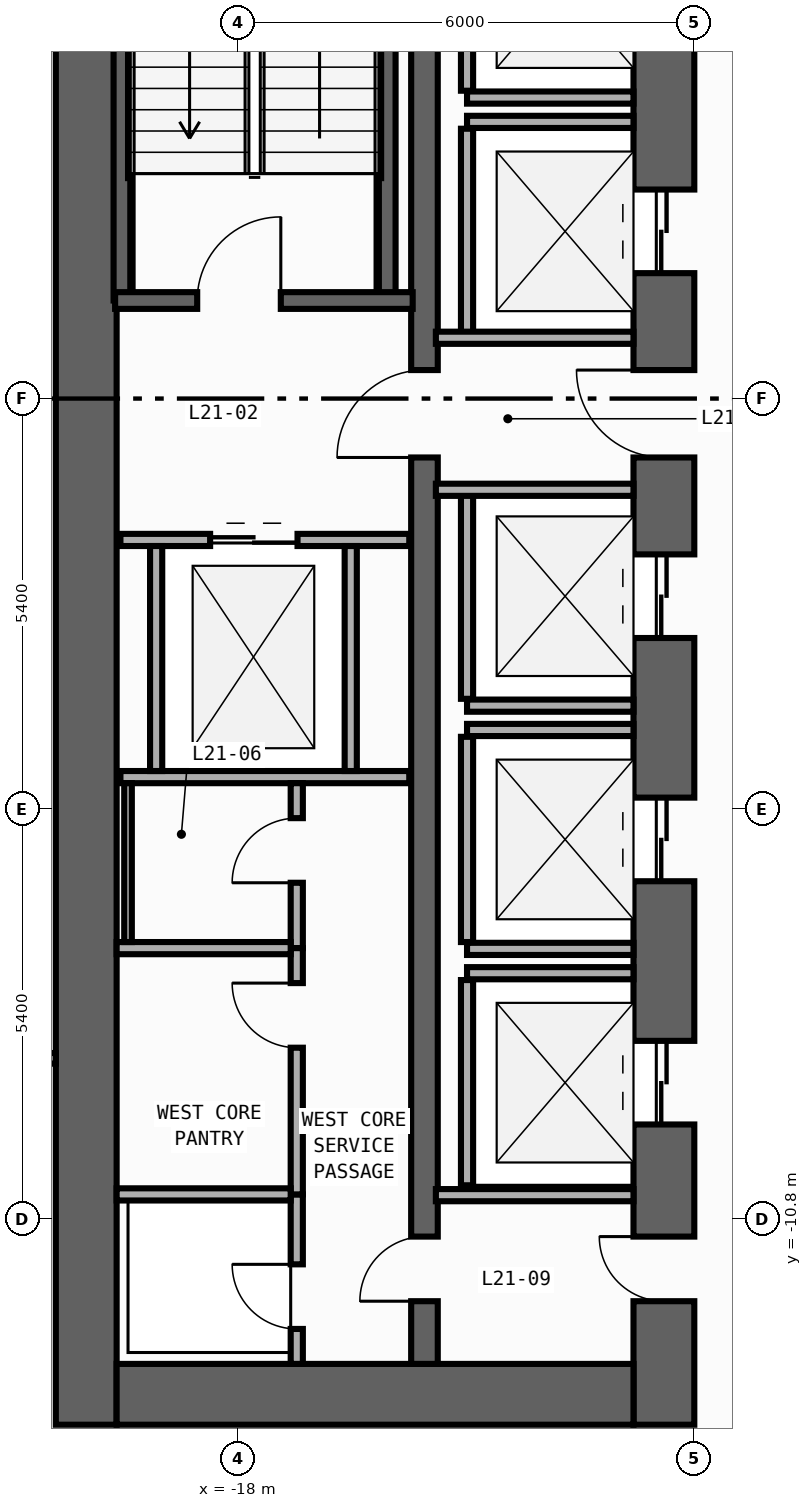
"""IFC4 building model, lengths in metres.
Left out: names, types, materials, properties, quantities, classifications, styles, units other than length and angle.
Written with IfcOpenShell. Run it as: python <this file> out.ifc"""

import sys

from ifc_helpers import new_model, si_unit, direction, frame, frame_2d, origin, place, context, subcontext, project, spatial, rectangle, extrude, element, fill, save


model = new_model("IFC4")
c1 = context("Model", 3, precision=1e-05, world=origin(), true_north=direction((0.0, 1.0)))
c2 = subcontext(c1, "Body", "Model", "MODEL_VIEW")
j1 = project(units=[si_unit("LENGTHUNIT", "METRE"), si_unit("PLANEANGLEUNIT", "RADIAN")], contexts=[c1])
p1 = place(None, origin())
s1 = spatial("IfcSite", under=j1, at=p1, CompositionType="ELEMENT")
p2 = place(p1, origin())
s2 = spatial("IfcBuilding", under=s1, at=p2, CompositionType="ELEMENT")
p3 = place(p2, frame((0.0, 0.0, 93.2)))
s3 = spatial("IfcBuildingStorey", under=s2, at=p3, CompositionType="ELEMENT", Elevation=93.2)
p4 = place(p3, frame((-20.0, -13.5, 0.0), z_axis=(0.0, 0.0, 1.0), x_axis=(0.0, 1.0, 0.0)))
e1 = element("IfcWall", 1, at=p4, inside=s3, PredefinedType="SHEAR", context=c2, shape_type="SweptSolid", body=[
    extrude(rectangle(XDim=27.0, YDim=0.8, at=frame_2d((13.5, 0.0))), origin(), (0.0, 0.0, 1.0), 3.94),
])
p5 = place(p3, frame((-12.4, -13.5, 0.0), z_axis=(0.0, 0.0, 1.0), x_axis=(0.0, 1.0, 0.0)))
e2 = element("IfcWall", 2, at=p5, inside=s3, PredefinedType="SHEAR", context=c2, shape_type="SweptSolid", body=[
    extrude(rectangle(XDim=27.0, YDim=0.8, at=frame_2d((13.5, 0.0))), origin(), (0.0, 0.0, 1.0), 3.94),
])
p6 = place(p5, frame((21.55, 0.0, 0.0)))
e3 = element("IfcOpeningElement", 3, at=p6, cuts=e2, PredefinedType="OPENING", context=c2, shape_type="SweptSolid", body=[
    extrude(rectangle(XDim=1.1, YDim=2.2, at=frame_2d((0.55, 1.1))), frame((0.0, 0.41, 0.0), z_axis=(0.0, -1.0, 0.0), x_axis=(1.0, 0.0, 0.0)), (0.0, 0.0, 1.0), 0.82),
])
p7 = place(p5, frame((18.35, 0.0, 0.0)))
e4 = element("IfcOpeningElement", 4, at=p7, cuts=e2, PredefinedType="OPENING", context=c2, shape_type="SweptSolid", body=[
    extrude(rectangle(XDim=1.1, YDim=2.2, at=frame_2d((0.55, 1.1))), frame((0.0, 0.41, 0.0), z_axis=(0.0, -1.0, 0.0), x_axis=(1.0, 0.0, 0.0)), (0.0, 0.0, 1.0), 0.82),
])
p8 = place(p5, frame((15.15, 0.0, 0.0)))
e5 = element("IfcOpeningElement", 5, at=p8, cuts=e2, PredefinedType="OPENING", context=c2, shape_type="SweptSolid", body=[
    extrude(rectangle(XDim=1.1, YDim=2.2, at=frame_2d((0.55, 1.1))), frame((0.0, 0.41, 0.0), z_axis=(0.0, -1.0, 0.0), x_axis=(1.0, 0.0, 0.0)), (0.0, 0.0, 1.0), 0.82),
])
p9 = place(p5, frame((10.35, 0.0, 0.0)))
e6 = element("IfcOpeningElement", 6, at=p9, cuts=e2, PredefinedType="OPENING", context=c2, shape_type="SweptSolid", body=[
    extrude(rectangle(XDim=1.1, YDim=2.2, at=frame_2d((0.55, 1.1))), frame((0.0, 0.41, 0.0), z_axis=(0.0, -1.0, 0.0), x_axis=(1.0, 0.0, 0.0)), (0.0, 0.0, 1.0), 0.82),
])
p10 = place(p5, frame((7.15, 0.0, 0.0)))
e7 = element("IfcOpeningElement", 7, at=p10, cuts=e2, PredefinedType="OPENING", context=c2, shape_type="SweptSolid", body=[
    extrude(rectangle(XDim=1.1, YDim=2.2, at=frame_2d((0.55, 1.1))), frame((0.0, 0.41, 0.0), z_axis=(0.0, -1.0, 0.0), x_axis=(1.0, 0.0, 0.0)), (0.0, 0.0, 1.0), 0.82),
])
p11 = place(p5, frame((3.95, 0.0, 0.0)))
e8 = element("IfcOpeningElement", 8, at=p11, cuts=e2, PredefinedType="OPENING", context=c2, shape_type="SweptSolid", body=[
    extrude(rectangle(XDim=1.1, YDim=2.2, at=frame_2d((0.55, 1.1))), frame((0.0, 0.41, 0.0), z_axis=(0.0, -1.0, 0.0), x_axis=(1.0, 0.0, 0.0)), (0.0, 0.0, 1.0), 0.82),
])
p12 = place(p5, frame((12.725, 0.0, 0.0)))
e9 = element("IfcOpeningElement", 9, at=p12, cuts=e2, PredefinedType="OPENING", context=c2, shape_type="SweptSolid", body=[
    extrude(rectangle(XDim=1.15, YDim=2.2, at=frame_2d((0.575, 1.1))), frame((0.0, 0.41, 0.0), z_axis=(0.0, -1.0, 0.0), x_axis=(1.0, 0.0, 0.0)), (0.0, 0.0, 1.0), 0.82),
])
p13 = place(p5, frame((1.625, 0.0, 0.0)))
e10 = element("IfcOpeningElement", 10, at=p13, cuts=e2, PredefinedType="OPENING", context=c2, shape_type="SweptSolid", body=[
    extrude(rectangle(XDim=0.85, YDim=2.1, at=frame_2d((0.425, 1.05))), frame((0.0, 0.41, 0.0), z_axis=(0.0, -1.0, 0.0), x_axis=(1.0, 0.0, 0.0)), (0.0, 0.0, 1.0), 0.82),
])
p14 = place(p3, frame((-19.6, -13.1, 0.0), z_axis=(0.0, 0.0, 1.0), x_axis=(1.0, 0.0, 0.0)))
e11 = element("IfcWall", 11, at=p14, inside=s3, PredefinedType="SHEAR", context=c2, shape_type="SweptSolid", body=[
    extrude(rectangle(XDim=6.8, YDim=0.8, at=frame_2d((3.4, 0.0))), origin(), (0.0, 0.0, 1.0), 3.94),
])
p15 = place(p3, frame((-15.55, -12.7, 0.0), z_axis=(0.0, 0.0, 1.0), x_axis=(0.0, 1.0, 0.0)))
e12 = element("IfcWall", 12, at=p15, inside=s3, PredefinedType="SHEAR", context=c2, shape_type="SweptSolid", body=[
    extrude(rectangle(XDim=25.4, YDim=0.35, at=frame_2d((12.7, 0.0))), origin(), (0.0, 0.0, 1.0), 3.94),
])
p16 = place(p15, frame((11.925, 0.0, 0.0)))
e13 = element("IfcOpeningElement", 13, at=p16, cuts=e12, PredefinedType="OPENING", context=c2, shape_type="SweptSolid", body=[
    extrude(rectangle(XDim=1.15, YDim=2.2, at=frame_2d((0.575, 1.1))), frame((0.0, 0.185, 0.0), z_axis=(0.0, -1.0, 0.0), x_axis=(1.0, 0.0, 0.0)), (0.0, 0.0, 1.0), 0.37),
])
p17 = place(p15, frame((0.825, 0.0, 0.0)))
e14 = element("IfcOpeningElement", 14, at=p17, cuts=e12, PredefinedType="OPENING", context=c2, shape_type="SweptSolid", body=[
    extrude(rectangle(XDim=0.85, YDim=2.1, at=frame_2d((0.425, 1.05))), frame((0.0, 0.185, 0.0), z_axis=(0.0, -1.0, 0.0), x_axis=(1.0, 0.0, 0.0)), (0.0, 0.0, 1.0), 0.37),
])
for number, where, z_axis, x_axis in (
    (15, (-16.04, 1.29, 0.0), (0.0, 0.0, 1.0), (0.0, 1.0, 0.0)),
    (16, (-19.53, 1.29, 0.0), (0.0, 0.0, 1.0), (0.0, 1.0, 0.0)),
):
    element("IfcWall", number, at=place(p3, frame(where, z_axis=z_axis, x_axis=x_axis)), inside=s3, PredefinedType="SHEAR", context=c2, shape_type="SweptSolid", body=[
        extrude(rectangle(XDim=11.3, YDim=0.22, at=frame_2d((5.65, 0.0))), origin(), (0.0, 0.0, 1.0), 3.94),
    ])
p18 = place(p3, frame((-19.62, 1.29, 0.0), z_axis=(0.0, 0.0, 1.0), x_axis=(1.0, 0.0, 0.0)))
e17 = element("IfcWall", 17, at=p18, inside=s3, PredefinedType="SHEAR", context=c2, shape_type="SweptSolid", body=[
    extrude(rectangle(XDim=3.915, YDim=0.22, at=frame_2d((1.958, 0.0))), origin(), (0.0, 0.0, 1.0), 3.94),
])
p19 = place(p18, frame((1.08, 0.0, 0.0)))
e18 = element("IfcOpeningElement", 18, at=p19, cuts=e17, PredefinedType="OPENING", context=c2, shape_type="SweptSolid", body=[
    extrude(rectangle(XDim=1.1, YDim=2.2, at=frame_2d((0.55, 1.1))), frame((0.0, 0.12, 0.0), z_axis=(0.0, -1.0, 0.0), x_axis=(1.0, 0.0, 0.0)), (0.0, 0.0, 1.0), 0.24),
])
p20 = place(p3, frame((-14.99, 3.96, 0.0), z_axis=(0.0, 0.0, 1.0), x_axis=(1.0, 0.0, 0.0)))
e19 = element("IfcWall", 19, at=p20, inside=s3, PredefinedType="STANDARD", context=c2, shape_type="SweptSolid", body=[
    extrude(rectangle(XDim=2.19, YDim=0.16, at=frame_2d((1.095, 0.0))), origin(), (0.0, 0.0, 1.0), 3.94),
])
p21 = place(p3, frame((-14.99, 4.05, 0.0), z_axis=(0.0, 0.0, 1.0), x_axis=(0.0, 1.0, 0.0)))
e20 = element("IfcWall", 20, at=p21, inside=s3, PredefinedType="STANDARD", context=c2, shape_type="SweptSolid", body=[
    extrude(rectangle(XDim=2.7, YDim=0.16, at=frame_2d((1.35, 0.0))), origin(), (0.0, 0.0, 1.0), 3.94),
])
p22 = place(p3, frame((-14.99, 3.64, 0.0), z_axis=(0.0, 0.0, 1.0), x_axis=(1.0, 0.0, 0.0)))
e21 = element("IfcWall", 21, at=p22, inside=s3, PredefinedType="STANDARD", context=c2, shape_type="SweptSolid", body=[
    extrude(rectangle(XDim=2.19, YDim=0.16, at=frame_2d((1.095, 0.0))), origin(), (0.0, 0.0, 1.0), 3.94),
])
p23 = place(p3, frame((-14.99, 0.85, 0.0), z_axis=(0.0, 0.0, 1.0), x_axis=(0.0, 1.0, 0.0)))
e22 = element("IfcWall", 22, at=p23, inside=s3, PredefinedType="STANDARD", context=c2, shape_type="SweptSolid", body=[
    extrude(rectangle(XDim=2.7, YDim=0.16, at=frame_2d((1.35, 0.0))), origin(), (0.0, 0.0, 1.0), 3.94),
])
p24 = place(p3, frame((-14.99, -4.04, 0.0), z_axis=(0.0, 0.0, 1.0), x_axis=(1.0, 0.0, 0.0)))
e23 = element("IfcWall", 23, at=p24, inside=s3, PredefinedType="STANDARD", context=c2, shape_type="SweptSolid", body=[
    extrude(rectangle(XDim=2.19, YDim=0.16, at=frame_2d((1.095, 0.0))), origin(), (0.0, 0.0, 1.0), 3.94),
])
p25 = place(p3, frame((-14.99, -3.95, 0.0), z_axis=(0.0, 0.0, 1.0), x_axis=(0.0, 1.0, 0.0)))
e24 = element("IfcWall", 24, at=p25, inside=s3, PredefinedType="STANDARD", context=c2, shape_type="SweptSolid", body=[
    extrude(rectangle(XDim=2.7, YDim=0.16, at=frame_2d((1.35, 0.0))), origin(), (0.0, 0.0, 1.0), 3.94),
])
for number, where, z_axis, x_axis in (
    (25, (-14.99, -7.24, 0.0), (0.0, 0.0, 1.0), (1.0, 0.0, 0.0)),
    (26, (-14.99, -4.36, 0.0), (0.0, 0.0, 1.0), (1.0, 0.0, 0.0)),
):
    element("IfcWall", number, at=place(p3, frame(where, z_axis=z_axis, x_axis=x_axis)), inside=s3, PredefinedType="STANDARD", context=c2, shape_type="SweptSolid", body=[
        extrude(rectangle(XDim=2.19, YDim=0.16, at=frame_2d((1.095, 0.0))), origin(), (0.0, 0.0, 1.0), 3.94),
    ])
p26 = place(p3, frame((-14.99, -7.15, 0.0), z_axis=(0.0, 0.0, 1.0), x_axis=(0.0, 1.0, 0.0)))
e27 = element("IfcWall", 27, at=p26, inside=s3, PredefinedType="STANDARD", context=c2, shape_type="SweptSolid", body=[
    extrude(rectangle(XDim=2.7, YDim=0.16, at=frame_2d((1.35, 0.0))), origin(), (0.0, 0.0, 1.0), 3.94),
])
p27 = place(p3, frame((-14.99, -7.56, 0.0), z_axis=(0.0, 0.0, 1.0), x_axis=(1.0, 0.0, 0.0)))
e28 = element("IfcWall", 28, at=p27, inside=s3, PredefinedType="STANDARD", context=c2, shape_type="SweptSolid", body=[
    extrude(rectangle(XDim=2.19, YDim=0.16, at=frame_2d((1.095, 0.0))), origin(), (0.0, 0.0, 1.0), 3.94),
])
p28 = place(p3, frame((-14.99, -10.35, 0.0), z_axis=(0.0, 0.0, 1.0), x_axis=(0.0, 1.0, 0.0)))
e29 = element("IfcWall", 29, at=p28, inside=s3, PredefinedType="STANDARD", context=c2, shape_type="SweptSolid", body=[
    extrude(rectangle(XDim=2.7, YDim=0.16, at=frame_2d((1.35, 0.0))), origin(), (0.0, 0.0, 1.0), 3.94),
])
p29 = place(p3, frame((-19.55, -1.86, 0.0), z_axis=(0.0, 0.0, 1.0), x_axis=(1.0, 0.0, 0.0)))
e30 = element("IfcWall", 30, at=p29, inside=s3, PredefinedType="STANDARD", context=c2, shape_type="SweptSolid", body=[
    extrude(rectangle(XDim=3.8, YDim=0.16, at=frame_2d((1.9, 0.0))), origin(), (0.0, 0.0, 1.0), 3.94),
])
p30 = place(p29, frame((1.18, 0.0, 0.0)))
e31 = element("IfcOpeningElement", 31, at=p30, cuts=e30, PredefinedType="OPENING", context=c2, shape_type="SweptSolid", body=[
    extrude(rectangle(XDim=1.15, YDim=2.2, at=frame_2d((0.575, 1.1))), frame((0.0, 0.09, 0.0), z_axis=(0.0, -1.0, 0.0), x_axis=(1.0, 0.0, 0.0)), (0.0, 0.0, 1.0), 0.18),
])
p31 = place(p3, frame((-19.55, -4.98, 0.0), z_axis=(0.0, 0.0, 1.0), x_axis=(1.0, 0.0, 0.0)))
e32 = element("IfcWall", 32, at=p31, inside=s3, PredefinedType="STANDARD", context=c2, shape_type="SweptSolid", body=[
    extrude(rectangle(XDim=3.8, YDim=0.16, at=frame_2d((1.9, 0.0))), origin(), (0.0, 0.0, 1.0), 3.94),
])
for number, where, z_axis, x_axis in (
    (33, (-19.08, -4.9, 0.0), (0.0, 0.0, 1.0), (0.0, 1.0, 0.0)),
    (34, (-16.52, -4.9, 0.0), (0.0, 0.0, 1.0), (0.0, 1.0, 0.0)),
):
    element("IfcWall", number, at=place(p3, frame(where, z_axis=z_axis, x_axis=x_axis)), inside=s3, PredefinedType="STANDARD", context=c2, shape_type="SweptSolid", body=[
        extrude(rectangle(XDim=2.96, YDim=0.16, at=frame_2d((1.48, 0.0))), origin(), (0.0, 0.0, 1.0), 3.94),
    ])
for number, where, z_axis, x_axis in (
    (35, (-15.4, 0.8, 0.0), (0.0, 0.0, 1.0), (1.0, 0.0, 0.0)),
    (36, (-15.4, -1.2, 0.0), (0.0, 0.0, 1.0), (1.0, 0.0, 0.0)),
    (37, (-15.4, -10.48, 0.0), (0.0, 0.0, 1.0), (1.0, 0.0, 0.0)),
):
    element("IfcWall", number, at=place(p3, frame(where, z_axis=z_axis, x_axis=x_axis)), inside=s3, PredefinedType="STANDARD", context=c2, shape_type="SweptSolid", body=[
        extrude(rectangle(XDim=2.6, YDim=0.16, at=frame_2d((1.3, 0.0))), origin(), (0.0, 0.0, 1.0), 3.94),
    ])
p32 = place(p3, frame((-17.23, -12.7, 0.0), z_axis=(0.0, 0.0, 1.0), x_axis=(0.0, 1.0, 0.0)))
e38 = element("IfcWall", 38, at=p32, inside=s3, PredefinedType="PARTITIONING", context=c2, shape_type="SweptSolid", body=[
    extrude(rectangle(XDim=2.23, YDim=0.16, at=frame_2d((1.115, 0.0))), origin(), (0.0, 0.0, 1.0), 3.94),
])
p33 = place(p32, frame((0.46, 0.0, 0.0)))
e39 = element("IfcOpeningElement", 39, at=p33, cuts=e38, PredefinedType="OPENING", context=c2, shape_type="SweptSolid", body=[
    extrude(rectangle(XDim=0.85, YDim=2.1, at=frame_2d((0.425, 1.05))), frame((0.0, 0.09, 0.0), z_axis=(0.0, -1.0, 0.0), x_axis=(1.0, 0.0, 0.0)), (0.0, 0.0, 1.0), 0.18),
])
p34 = place(p3, frame((-17.23, -7.23, 0.0), z_axis=(0.0, 0.0, 1.0), x_axis=(0.0, 1.0, 0.0)))
e40 = element("IfcWall", 40, at=p34, inside=s3, PredefinedType="PARTITIONING", context=c2, shape_type="SweptSolid", body=[
    extrude(rectangle(XDim=2.17, YDim=0.16, at=frame_2d((1.085, 0.0))), origin(), (0.0, 0.0, 1.0), 3.94),
])
p35 = place(p34, frame((0.86, 0.0, 0.0)))
e41 = element("IfcOpeningElement", 41, at=p35, cuts=e40, PredefinedType="OPENING", context=c2, shape_type="SweptSolid", body=[
    extrude(rectangle(XDim=0.85, YDim=2.1, at=frame_2d((0.425, 1.05))), frame((0.0, 0.09, 0.0), z_axis=(0.0, -1.0, 0.0), x_axis=(1.0, 0.0, 0.0)), (0.0, 0.0, 1.0), 0.18),
])
p36 = place(p3, frame((-17.23, -10.47, 0.0), z_axis=(0.0, 0.0, 1.0), x_axis=(0.0, 1.0, 0.0)))
e42 = element("IfcWall", 42, at=p36, inside=s3, PredefinedType="PARTITIONING", context=c2, shape_type="SweptSolid", body=[
    extrude(rectangle(XDim=3.24, YDim=0.16, at=frame_2d((1.62, 0.0))), origin(), (0.0, 0.0, 1.0), 3.94),
])
p37 = place(p36, frame((1.93, 0.0, 0.0)))
e43 = element("IfcOpeningElement", 43, at=p37, cuts=e42, PredefinedType="OPENING", context=c2, shape_type="SweptSolid", body=[
    extrude(rectangle(XDim=0.85, YDim=2.1, at=frame_2d((0.425, 1.05))), frame((0.0, 0.09, 0.0), z_axis=(0.0, -1.0, 0.0), x_axis=(1.0, 0.0, 0.0)), (0.0, 0.0, 1.0), 0.18),
])
for number, where, z_axis, x_axis in (
    (44, (-19.6, -10.47, 0.0), (0.0, 0.0, 1.0), (1.0, 0.0, 0.0)),
    (45, (-19.6, -7.23, 0.0), (0.0, 0.0, 1.0), (1.0, 0.0, 0.0)),
):
    element("IfcWall", number, at=place(p3, frame(where, z_axis=z_axis, x_axis=x_axis)), inside=s3, PredefinedType="PARTITIONING", context=c2, shape_type="SweptSolid", body=[
        extrude(rectangle(XDim=2.29, YDim=0.16, at=frame_2d((1.145, 0.0))), origin(), (0.0, 0.0, 1.0), 3.94),
    ])
p38 = place(p3, frame((-23.455, -8.68, 0.0), z_axis=(0.0, 0.0, 1.0), x_axis=(1.0, 0.0, 0.0)))
e46 = element("IfcWall", 46, at=p38, inside=s3, PredefinedType="PARTITIONING", context=c2, shape_type="SweptSolid", body=[
    extrude(rectangle(XDim=3.055, YDim=0.14, at=frame_2d((1.528, 0.0))), origin(), (0.0, 0.0, 1.0), 3.94),
])
p39 = place(p38, frame((1.745, 0.0, 0.0)))
e47 = element("IfcOpeningElement", 47, at=p39, cuts=e46, PredefinedType="OPENING", context=c2, shape_type="SweptSolid", body=[
    extrude(rectangle(XDim=0.85, YDim=2.1, at=frame_2d((0.425, 1.05))), frame((0.0, 0.08, 0.0), z_axis=(0.0, -1.0, 0.0), x_axis=(1.0, 0.0, 0.0)), (0.0, 0.0, 1.0), 0.16),
])
p40 = place(p3, frame((-19.45, -7.15, 0.0), z_axis=(0.0, 0.0, 1.0), x_axis=(0.0, 1.0, 0.0)))
e48 = element("IfcWall", 48, at=p40, inside=s3, PredefinedType="PARTITIONING", context=c2, shape_type="SweptSolid", body=[
    extrude(rectangle(XDim=2.09, YDim=0.1, at=frame_2d((1.045, 0.0))), origin(), (0.0, 0.0, 1.0), 3.94),
])
p41 = place(p19, origin())
e49 = element("IfcDoor", 49, at=p41, inside=s3, OperationType="SINGLE_SWING_RIGHT", PredefinedType="DOOR", context=c2, shape_type="SweptSolid", body=[
    extrude(rectangle(XDim=1.1, YDim=2.2, at=frame_2d((0.55, 1.1))), frame((0.0, 0.025, 0.0), z_axis=(0.0, -1.0, 0.0), x_axis=(1.0, 0.0, 0.0)), (0.0, 0.0, 1.0), 0.05),
])
fill(e18, e49)
p42 = place(p8, origin())
e50 = element("IfcDoor", 50, at=p42, inside=s3, OperationType="DOUBLE_DOOR_SLIDING", PredefinedType="DOOR", context=c2, shape_type="SweptSolid", body=[
    extrude(rectangle(XDim=1.1, YDim=2.2, at=frame_2d((0.55, 1.1))), frame((0.0, 0.025, 0.0), z_axis=(0.0, -1.0, 0.0), x_axis=(1.0, 0.0, 0.0)), (0.0, 0.0, 1.0), 0.05),
])
fill(e5, e50)
p43 = place(p9, origin())
e51 = element("IfcDoor", 51, at=p43, inside=s3, OperationType="DOUBLE_DOOR_SLIDING", PredefinedType="DOOR", context=c2, shape_type="SweptSolid", body=[
    extrude(rectangle(XDim=1.1, YDim=2.2, at=frame_2d((0.55, 1.1))), frame((0.0, 0.025, 0.0), z_axis=(0.0, -1.0, 0.0), x_axis=(1.0, 0.0, 0.0)), (0.0, 0.0, 1.0), 0.05),
])
fill(e6, e51)
p44 = place(p10, origin())
e52 = element("IfcDoor", 52, at=p44, inside=s3, OperationType="DOUBLE_DOOR_SLIDING", PredefinedType="DOOR", context=c2, shape_type="SweptSolid", body=[
    extrude(rectangle(XDim=1.1, YDim=2.2, at=frame_2d((0.55, 1.1))), frame((0.0, 0.025, 0.0), z_axis=(0.0, -1.0, 0.0), x_axis=(1.0, 0.0, 0.0)), (0.0, 0.0, 1.0), 0.05),
])
fill(e7, e52)
p45 = place(p11, origin())
e53 = element("IfcDoor", 53, at=p45, inside=s3, OperationType="DOUBLE_DOOR_SLIDING", PredefinedType="DOOR", context=c2, shape_type="SweptSolid", body=[
    extrude(rectangle(XDim=1.1, YDim=2.2, at=frame_2d((0.55, 1.1))), frame((0.0, 0.025, 0.0), z_axis=(0.0, -1.0, 0.0), x_axis=(1.0, 0.0, 0.0)), (0.0, 0.0, 1.0), 0.05),
])
fill(e8, e53)
p46 = place(p12, origin())
e54 = element("IfcDoor", 54, at=p46, inside=s3, OperationType="SINGLE_SWING_RIGHT", PredefinedType="DOOR", context=c2, shape_type="SweptSolid", body=[
    extrude(rectangle(XDim=1.15, YDim=2.2, at=frame_2d((0.575, 1.1))), frame((0.0, 0.025, 0.0), z_axis=(0.0, -1.0, 0.0), x_axis=(1.0, 0.0, 0.0)), (0.0, 0.0, 1.0), 0.05),
])
fill(e9, e54)
p47 = place(p16, origin())
e55 = element("IfcDoor", 55, at=p47, inside=s3, OperationType="SINGLE_SWING_LEFT", PredefinedType="DOOR", context=c2, shape_type="SweptSolid", body=[
    extrude(rectangle(XDim=1.15, YDim=2.2, at=frame_2d((0.575, 1.1))), frame((0.0, 0.025, 0.0), z_axis=(0.0, -1.0, 0.0), x_axis=(1.0, 0.0, 0.0)), (0.0, 0.0, 1.0), 0.05),
])
fill(e13, e55)
p48 = place(p13, origin())
e56 = element("IfcDoor", 56, at=p48, inside=s3, OperationType="SINGLE_SWING_RIGHT", PredefinedType="DOOR", context=c2, shape_type="SweptSolid", body=[
    extrude(rectangle(XDim=0.85, YDim=2.1, at=frame_2d((0.425, 1.05))), frame((0.0, 0.025, 0.0), z_axis=(0.0, -1.0, 0.0), x_axis=(1.0, 0.0, 0.0)), (0.0, 0.0, 1.0), 0.05),
])
fill(e10, e56)
p49 = place(p17, origin())
e57 = element("IfcDoor", 57, at=p49, inside=s3, OperationType="SINGLE_SWING_LEFT", PredefinedType="DOOR", context=c2, shape_type="SweptSolid", body=[
    extrude(rectangle(XDim=0.85, YDim=2.1, at=frame_2d((0.425, 1.05))), frame((0.0, 0.025, 0.0), z_axis=(0.0, -1.0, 0.0), x_axis=(1.0, 0.0, 0.0)), (0.0, 0.0, 1.0), 0.05),
])
fill(e14, e57)
p50 = place(p30, origin())
e58 = element("IfcDoor", 58, at=p50, inside=s3, OperationType="DOUBLE_DOOR_SLIDING", PredefinedType="DOOR", context=c2, shape_type="SweptSolid", body=[
    extrude(rectangle(XDim=1.15, YDim=2.2, at=frame_2d((0.575, 1.1))), frame((0.0, 0.025, 0.0), z_axis=(0.0, -1.0, 0.0), x_axis=(1.0, 0.0, 0.0)), (0.0, 0.0, 1.0), 0.05),
])
fill(e31, e58)
p51 = place(p33, origin())
e59 = element("IfcDoor", 59, at=p51, inside=s3, OperationType="SINGLE_SWING_RIGHT", PredefinedType="DOOR", context=c2, shape_type="SweptSolid", body=[
    extrude(rectangle(XDim=0.85, YDim=2.1, at=frame_2d((0.425, 1.05))), frame((0.0, 0.025, 0.0), z_axis=(0.0, -1.0, 0.0), x_axis=(1.0, 0.0, 0.0)), (0.0, 0.0, 1.0), 0.05),
])
fill(e39, e59)
p52 = place(p35, origin())
e60 = element("IfcDoor", 60, at=p52, inside=s3, OperationType="SINGLE_SWING_LEFT", PredefinedType="DOOR", context=c2, shape_type="SweptSolid", body=[
    extrude(rectangle(XDim=0.85, YDim=2.1, at=frame_2d((0.425, 1.05))), frame((0.0, 0.025, 0.0), z_axis=(0.0, -1.0, 0.0), x_axis=(1.0, 0.0, 0.0)), (0.0, 0.0, 1.0), 0.05),
])
fill(e41, e60)
p53 = place(p37, origin())
e61 = element("IfcDoor", 61, at=p53, inside=s3, OperationType="SINGLE_SWING_RIGHT", PredefinedType="DOOR", context=c2, shape_type="SweptSolid", body=[
    extrude(rectangle(XDim=0.85, YDim=2.1, at=frame_2d((0.425, 1.05))), frame((0.0, 0.025, 0.0), z_axis=(0.0, -1.0, 0.0), x_axis=(1.0, 0.0, 0.0)), (0.0, 0.0, 1.0), 0.05),
])
fill(e43, e61)
save(model, sys.argv[1])
